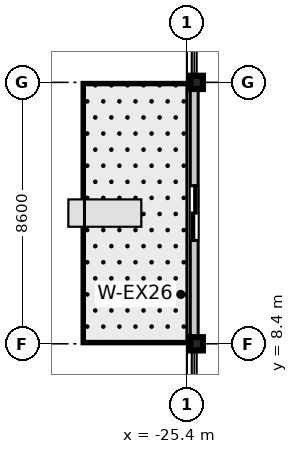
"""IFC4 building model, lengths in metres.
Left out: names, types, materials, properties, quantities, classifications, styles, units other than length and angle.
Written with IfcOpenShell. Run it as: python <this file> out.ifc"""

import sys

from ifc_helpers import new_model, si_unit, direction, frame, frame_2d, origin, origin_2d, place, context, subcontext, project, spatial, rectangle, i_section, extrude, source, transform, mapped, element, fill, save


model = new_model("IFC4")
c1 = context("Model", 3, precision=1e-05, world=origin(), true_north=direction((0.0, 1.0)))
c2 = subcontext(c1, "Body", "Model", "MODEL_VIEW")
j1 = project(units=[si_unit("LENGTHUNIT", "METRE"), si_unit("PLANEANGLEUNIT", "RADIAN")], contexts=[c1])
p1 = place(None, origin())
s1 = spatial("IfcSite", under=j1, at=p1, CompositionType="ELEMENT")
p2 = place(p1, origin())
s2 = spatial("IfcBuilding", under=s1, at=p2, CompositionType="ELEMENT")
p3 = place(p2, frame((0.0, 0.0, 47.0)))
s3 = spatial("IfcBuildingStorey", under=s2, at=p3, CompositionType="ELEMENT", Elevation=47.0)
m1 = source(origin(), c2, "Body", "SweptSolid", [
    extrude(i_section(OverallWidth=0.412, OverallDepth=0.438, WebThickness=0.023, FlangeThickness=0.036, at=origin_2d()), origin(), (0.0, 0.0, 1.0), 3.605),
])
for number, where, z_axis, x_axis in (
    (1, (-25.08, 8.4, 0.0), (0.0, 0.0, 1.0), (1.0, 0.0, 0.0)),
    (2, (-25.08, 17.0, 0.0), (0.0, 0.0, 1.0), (1.0, 0.0, 0.0)),
):
    element("IfcColumn", number, at=place(p3, frame(where, z_axis=z_axis, x_axis=x_axis)), inside=s3, PredefinedType="COLUMN", context=c2, shape_type="MappedRepresentation", body=[
        mapped(m1, transform((0.0, 0.0, 0.0), scale=1.0)),
    ])
m2 = source(origin(), c2, "Body", "SweptSolid", [
    extrude(rectangle(XDim=8.6, YDim=0.26, at=frame_2d((4.3, 0.0))), origin(), (0.0, 0.0, 1.0), 2.85),
])
p4 = place(p3, frame((-25.16, 8.4, 0.0), z_axis=(0.0, 0.0, 1.0), x_axis=(0.0, 1.0, 0.0)))
e3 = element("IfcWall", 3, at=p4, inside=s3, PredefinedType="STANDARD", context=c2, shape_type="MappedRepresentation", body=[
    mapped(m2, transform((0.0, 0.0, 0.0), scale=1.0)),
])
p5 = place(p4, frame((3.4, 0.0, 0.0)))
e4 = element("IfcOpeningElement", 4, at=p5, cuts=e3, PredefinedType="OPENING", context=c2, shape_type="SweptSolid", body=[
    extrude(rectangle(XDim=1.8, YDim=2.25, at=frame_2d((0.9, 1.125))), frame((0.0, 0.14, 0.0), z_axis=(0.0, -1.0, 0.0), x_axis=(1.0, 0.0, 0.0)), (0.0, 0.0, 1.0), 0.28),
])
m3 = source(origin(), c2, "Body", "SweptSolid", [
    extrude(rectangle(XDim=1.8, YDim=2.25, at=frame_2d((0.9, 1.125))), frame((0.0, 0.025, 0.0), z_axis=(0.0, -1.0, 0.0), x_axis=(1.0, 0.0, 0.0)), (0.0, 0.0, 1.0), 0.05),
])
p6 = place(p5, origin())
e5 = element("IfcDoor", 5, at=p6, inside=s3, OperationType="DOUBLE_DOOR_SLIDING", PredefinedType="DOOR", context=c2, shape_type="MappedRepresentation", body=[
    mapped(m3, transform((0.0, 0.0, 0.0), scale=1.0)),
])
fill(e4, e5)
save(model, sys.argv[1])
